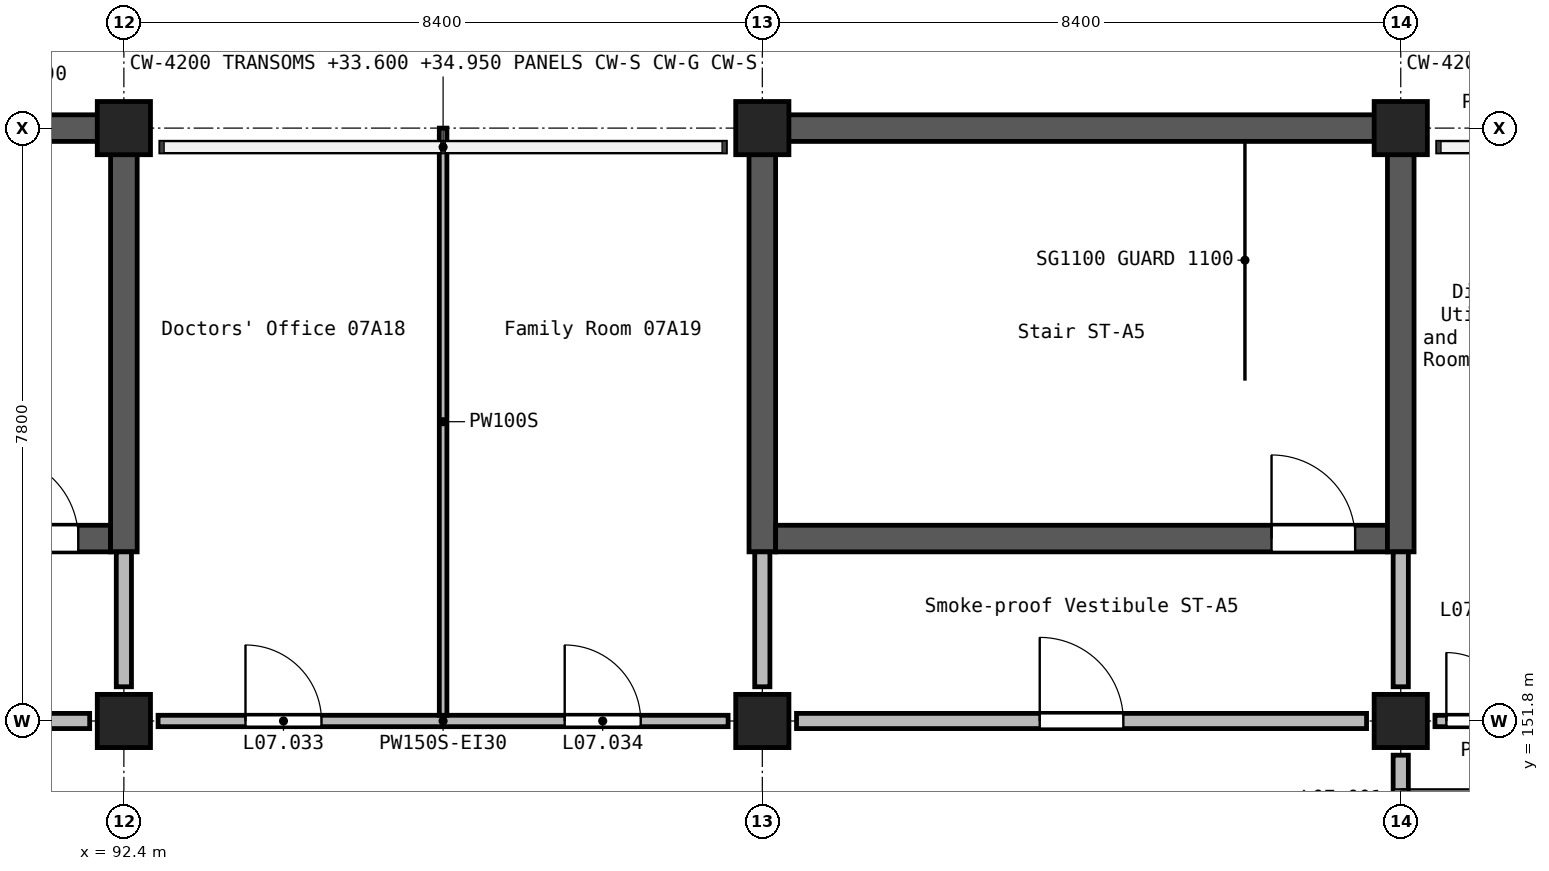
"""IFC4 building model, lengths in metres.
Left out: names, types, materials, properties, quantities, classifications, styles, units other than length and angle.
Written with IfcOpenShell. Run it as: python <this file> out.ifc"""

import sys

from ifc_helpers import new_model, si_unit, direction, frame, frame_2d, origin, origin_2d, place, context, subcontext, project, spatial, rectangle, extrude, element, fill, save


model = new_model("IFC4")
c1 = context("Model", 3, precision=1e-05, world=origin(), true_north=direction((0.0, 1.0)))
c2 = subcontext(c1, "Body", "Model", "MODEL_VIEW")
j1 = project(units=[si_unit("LENGTHUNIT", "METRE"), si_unit("PLANEANGLEUNIT", "RADIAN")], contexts=[c1])
p1 = place(None, origin())
s1 = spatial("IfcSite", under=j1, at=p1, CompositionType="ELEMENT")
p2 = place(p1, origin())
s2 = spatial("IfcBuilding", under=s1, at=p2, CompositionType="ELEMENT")
p3 = place(p2, frame((0.0, 0.0, 32.7)))
s3 = spatial("IfcBuildingStorey", under=s2, at=p3, CompositionType="ELEMENT", Elevation=32.7)
for number, where, z_axis, x_axis in (
    (1, (92.4, 151.8, 0.0), (0.0, 0.0, 1.0), (1.0, 0.0, 0.0)),
    (2, (92.4, 159.6, 0.0), (0.0, 0.0, 1.0), (1.0, 0.0, 0.0)),
    (3, (100.8, 151.8, 0.0), (0.0, 0.0, 1.0), (1.0, 0.0, 0.0)),
    (4, (100.8, 159.6, 0.0), (0.0, 0.0, 1.0), (1.0, 0.0, 0.0)),
    (5, (109.2, 151.8, 0.0), (0.0, 0.0, 1.0), (1.0, 0.0, 0.0)),
    (6, (109.2, 159.6, 0.0), (0.0, 0.0, 1.0), (1.0, 0.0, 0.0)),
):
    element("IfcColumn", number, at=place(p3, frame(where, z_axis=z_axis, x_axis=x_axis)), inside=s3, PredefinedType="COLUMN", context=c2, shape_type="SweptSolid", body=[
        extrude(rectangle(XDim=0.7, YDim=0.7, at=origin_2d()), origin(), (0.0, 0.0, 1.0), 3.9),
    ])
p4 = place(p3, frame((83.825, 159.6, 0.0), z_axis=(0.0, 0.0, 1.0), x_axis=(1.0, 0.0, 0.0)))
e7 = element("IfcWall", 7, at=p4, inside=s3, PredefinedType="SHEAR", context=c2, shape_type="SweptSolid", body=[
    extrude(rectangle(XDim=8.4, YDim=0.35, at=frame_2d((4.2, 0.0))), origin(), (0.0, 0.0, 1.0), 3.9),
])
p5 = place(p3, frame((84.175, 154.2, 0.0), z_axis=(0.0, 0.0, 1.0), x_axis=(1.0, 0.0, 0.0)))
e8 = element("IfcWall", 8, at=p5, inside=s3, PredefinedType="SHEAR", context=c2, shape_type="SweptSolid", body=[
    extrude(rectangle(XDim=8.05, YDim=0.35, at=frame_2d((4.025, 0.0))), origin(), (0.0, 0.0, 1.0), 3.9),
])
p6 = place(p5, frame((6.525, 0.0, 0.0)))
e9 = element("IfcOpeningElement", 9, at=p6, cuts=e8, PredefinedType="OPENING", context=c2, shape_type="SweptSolid", body=[
    extrude(rectangle(XDim=1.1, YDim=2.1, at=frame_2d((0.55, 1.05))), frame((0.0, 0.185, 0.0), z_axis=(0.0, -1.0, 0.0), x_axis=(1.0, 0.0, 0.0)), (0.0, 0.0, 1.0), 0.37),
])
p7 = place(p3, frame((92.4, 154.025, 0.0), z_axis=(0.0, 0.0, 1.0), x_axis=(0.0, 1.0, 0.0)))
e10 = element("IfcWall", 10, at=p7, inside=s3, PredefinedType="SHEAR", context=c2, shape_type="SweptSolid", body=[
    extrude(rectangle(XDim=5.75, YDim=0.35, at=frame_2d((2.875, 0.0))), origin(), (0.0, 0.0, 1.0), 3.9),
])
p8 = place(p3, frame((100.625, 159.6, 0.0), z_axis=(0.0, 0.0, 1.0), x_axis=(1.0, 0.0, 0.0)))
e11 = element("IfcWall", 11, at=p8, inside=s3, PredefinedType="SHEAR", context=c2, shape_type="SweptSolid", body=[
    extrude(rectangle(XDim=8.4, YDim=0.35, at=frame_2d((4.2, 0.0))), origin(), (0.0, 0.0, 1.0), 3.9),
])
p9 = place(p3, frame((100.8, 154.025, 0.0), z_axis=(0.0, 0.0, 1.0), x_axis=(0.0, 1.0, 0.0)))
e12 = element("IfcWall", 12, at=p9, inside=s3, PredefinedType="SHEAR", context=c2, shape_type="SweptSolid", body=[
    extrude(rectangle(XDim=5.4, YDim=0.35, at=frame_2d((2.7, 0.0))), origin(), (0.0, 0.0, 1.0), 3.9),
])
p10 = place(p3, frame((100.975, 154.2, 0.0), z_axis=(0.0, 0.0, 1.0), x_axis=(1.0, 0.0, 0.0)))
e13 = element("IfcWall", 13, at=p10, inside=s3, PredefinedType="SHEAR", context=c2, shape_type="SweptSolid", body=[
    extrude(rectangle(XDim=8.05, YDim=0.35, at=frame_2d((4.025, 0.0))), origin(), (0.0, 0.0, 1.0), 3.9),
])
p11 = place(p10, frame((6.525, 0.0, 0.0)))
e14 = element("IfcOpeningElement", 14, at=p11, cuts=e13, PredefinedType="OPENING", context=c2, shape_type="SweptSolid", body=[
    extrude(rectangle(XDim=1.1, YDim=2.1, at=frame_2d((0.55, 1.05))), frame((0.0, 0.185, 0.0), z_axis=(0.0, -1.0, 0.0), x_axis=(1.0, 0.0, 0.0)), (0.0, 0.0, 1.0), 0.37),
])
p12 = place(p3, frame((109.2, 154.025, 0.0), z_axis=(0.0, 0.0, 1.0), x_axis=(0.0, 1.0, 0.0)))
e15 = element("IfcWall", 15, at=p12, inside=s3, PredefinedType="SHEAR", context=c2, shape_type="SweptSolid", body=[
    extrude(rectangle(XDim=5.75, YDim=0.35, at=frame_2d((2.875, 0.0))), origin(), (0.0, 0.0, 1.0), 3.9),
])
p13 = place(p3, frame((109.2, 154.025, 0.0), z_axis=(0.0, 0.0, 1.0), x_axis=(0.0, -1.0, 0.0)))
e16 = element("IfcWall", 16, at=p13, inside=s3, PredefinedType="SOLIDWALL", context=c2, shape_type="SweptSolid", body=[
    extrude(rectangle(XDim=1.775, YDim=0.2, at=frame_2d((0.887, 0.0))), origin(), (0.0, 0.0, 1.0), 3.6),
])
p14 = place(p3, frame((109.2, 151.35, 0.0), z_axis=(0.0, 0.0, 1.0), x_axis=(0.0, -1.0, 0.0)))
e17 = element("IfcWall", 17, at=p14, inside=s3, PredefinedType="SOLIDWALL", context=c2, shape_type="SweptSolid", body=[
    extrude(rectangle(XDim=2.7, YDim=0.2, at=frame_2d((1.35, 0.0))), origin(), (0.0, 0.0, 1.0), 3.6),
])
p15 = place(p14, frame((0.45, 0.0, 0.0)))
e18 = element("IfcOpeningElement", 18, at=p15, cuts=e17, PredefinedType="OPENING", context=c2, shape_type="SweptSolid", body=[
    extrude(rectangle(XDim=1.8, YDim=2.1, at=frame_2d((0.9, 1.05))), frame((0.0, 0.11, 0.0), z_axis=(0.0, -1.0, 0.0), x_axis=(1.0, 0.0, 0.0)), (0.0, 0.0, 1.0), 0.22),
])
p16 = place(p3, frame((84.45, 151.8, 0.0), z_axis=(0.0, 0.0, 1.0), x_axis=(1.0, 0.0, 0.0)))
e19 = element("IfcWall", 19, at=p16, inside=s3, PredefinedType="SOLIDWALL", context=c2, shape_type="SweptSolid", body=[
    extrude(rectangle(XDim=7.5, YDim=0.2, at=frame_2d((3.75, 0.0))), origin(), (0.0, 0.0, 1.0), 3.6),
])
p17 = place(p16, frame((3.2, 0.0, 0.0)))
e20 = element("IfcOpeningElement", 20, at=p17, cuts=e19, PredefinedType="OPENING", context=c2, shape_type="SweptSolid", body=[
    extrude(rectangle(XDim=1.1, YDim=2.1, at=frame_2d((0.55, 1.05))), frame((0.0, 0.11, 0.0), z_axis=(0.0, -1.0, 0.0), x_axis=(1.0, 0.0, 0.0)), (0.0, 0.0, 1.0), 0.22),
])
p18 = place(p3, frame((101.25, 151.8, 0.0), z_axis=(0.0, 0.0, 1.0), x_axis=(1.0, 0.0, 0.0)))
e21 = element("IfcWall", 21, at=p18, inside=s3, PredefinedType="SOLIDWALL", context=c2, shape_type="SweptSolid", body=[
    extrude(rectangle(XDim=7.5, YDim=0.2, at=frame_2d((3.75, 0.0))), origin(), (0.0, 0.0, 1.0), 3.6),
])
p19 = place(p18, frame((3.2, 0.0, 0.0)))
e22 = element("IfcOpeningElement", 22, at=p19, cuts=e21, PredefinedType="OPENING", context=c2, shape_type="SweptSolid", body=[
    extrude(rectangle(XDim=1.1, YDim=2.1, at=frame_2d((0.55, 1.05))), frame((0.0, 0.11, 0.0), z_axis=(0.0, -1.0, 0.0), x_axis=(1.0, 0.0, 0.0)), (0.0, 0.0, 1.0), 0.22),
])
for number, where, z_axis, x_axis in (
    (23, (92.4, 152.25, 0.0), (0.0, 0.0, 1.0), (0.0, 1.0, 0.0)),
    (24, (100.8, 152.25, 0.0), (0.0, 0.0, 1.0), (0.0, 1.0, 0.0)),
):
    element("IfcWall", number, at=place(p3, frame(where, z_axis=z_axis, x_axis=x_axis)), inside=s3, PredefinedType="SOLIDWALL", context=c2, shape_type="SweptSolid", body=[
        extrude(rectangle(XDim=1.775, YDim=0.2, at=frame_2d((0.887, 0.0))), origin(), (0.0, 0.0, 1.0), 3.6),
    ])
p20 = place(p3, frame((92.85, 151.8, 0.0), z_axis=(0.0, 0.0, 1.0), x_axis=(1.0, 0.0, 0.0)))
e25 = element("IfcWall", 25, at=p20, inside=s3, PredefinedType="PARTITIONING", context=c2, shape_type="SweptSolid", body=[
    extrude(rectangle(XDim=7.5, YDim=0.15, at=frame_2d((3.75, 0.0))), origin(), (0.0, 0.0, 1.0), 3.6),
])
p21 = place(p20, frame((1.15, 0.0, 0.0)))
e26 = element("IfcOpeningElement", 26, at=p21, cuts=e25, PredefinedType="OPENING", context=c2, shape_type="SweptSolid", body=[
    extrude(rectangle(XDim=1.0, YDim=2.1, at=frame_2d((0.5, 1.05))), frame((0.0, 0.085, 0.0), z_axis=(0.0, -1.0, 0.0), x_axis=(1.0, 0.0, 0.0)), (0.0, 0.0, 1.0), 0.17),
])
p22 = place(p20, frame((5.35, 0.0, 0.0)))
e27 = element("IfcOpeningElement", 27, at=p22, cuts=e25, PredefinedType="OPENING", context=c2, shape_type="SweptSolid", body=[
    extrude(rectangle(XDim=1.0, YDim=2.1, at=frame_2d((0.5, 1.05))), frame((0.0, 0.085, 0.0), z_axis=(0.0, -1.0, 0.0), x_axis=(1.0, 0.0, 0.0)), (0.0, 0.0, 1.0), 0.17),
])
p23 = place(p3, frame((109.65, 151.8, 0.0), z_axis=(0.0, 0.0, 1.0), x_axis=(1.0, 0.0, 0.0)))
e28 = element("IfcWall", 28, at=p23, inside=s3, PredefinedType="PARTITIONING", context=c2, shape_type="SweptSolid", body=[
    extrude(rectangle(XDim=1.575, YDim=0.15, at=frame_2d((0.788, 0.0))), origin(), (0.0, 0.0, 1.0), 3.6),
])
p24 = place(p23, frame((0.15, 0.0, 0.0)))
e29 = element("IfcOpeningElement", 29, at=p24, cuts=e28, PredefinedType="OPENING", context=c2, shape_type="SweptSolid", body=[
    extrude(rectangle(XDim=0.9, YDim=2.1, at=frame_2d((0.45, 1.05))), frame((0.0, 0.085, 0.0), z_axis=(0.0, -1.0, 0.0), x_axis=(1.0, 0.0, 0.0)), (0.0, 0.0, 1.0), 0.17),
])
p25 = place(p3, frame((96.6, 151.875, 0.0), z_axis=(0.0, 0.0, 1.0), x_axis=(0.0, 1.0, 0.0)))
e30 = element("IfcWall", 30, at=p25, inside=s3, PredefinedType="PARTITIONING", context=c2, shape_type="SweptSolid", body=[
    extrude(rectangle(XDim=7.725, YDim=0.1, at=frame_2d((3.863, 0.0))), origin(), (0.0, 0.0, 1.0), 3.6),
])
p26 = place(p15, origin())
e31 = element("IfcDoor", 31, at=p26, inside=s3, OperationType="DOUBLE_DOOR_SINGLE_SWING", PredefinedType="DOOR", context=c2, shape_type="SweptSolid", body=[
    extrude(rectangle(XDim=1.8, YDim=2.1, at=frame_2d((0.9, 1.05))), frame((0.0, 0.025, 0.0), z_axis=(0.0, -1.0, 0.0), x_axis=(1.0, 0.0, 0.0)), (0.0, 0.0, 1.0), 0.05),
])
fill(e18, e31)
p27 = place(p21, origin())
e32 = element("IfcDoor", 32, at=p27, inside=s3, OperationType="SINGLE_SWING_LEFT", PredefinedType="DOOR", context=c2, shape_type="SweptSolid", body=[
    extrude(rectangle(XDim=1.0, YDim=2.1, at=frame_2d((0.5, 1.05))), frame((0.0, 0.025, 0.0), z_axis=(0.0, -1.0, 0.0), x_axis=(1.0, 0.0, 0.0)), (0.0, 0.0, 1.0), 0.05),
])
fill(e26, e32)
p28 = place(p22, origin())
e33 = element("IfcDoor", 33, at=p28, inside=s3, OperationType="SINGLE_SWING_RIGHT", PredefinedType="DOOR", context=c2, shape_type="SweptSolid", body=[
    extrude(rectangle(XDim=1.0, YDim=2.1, at=frame_2d((0.5, 1.05))), frame((0.0, 0.025, 0.0), z_axis=(0.0, -1.0, 0.0), x_axis=(1.0, 0.0, 0.0)), (0.0, 0.0, 1.0), 0.05),
])
fill(e27, e33)
p29 = place(p24, origin())
e34 = element("IfcDoor", 34, at=p29, inside=s3, OperationType="SINGLE_SWING_LEFT", PredefinedType="DOOR", context=c2, shape_type="SweptSolid", body=[
    extrude(rectangle(XDim=0.9, YDim=2.1, at=frame_2d((0.45, 1.05))), frame((0.0, 0.025, 0.0), z_axis=(0.0, -1.0, 0.0), x_axis=(1.0, 0.0, 0.0)), (0.0, 0.0, 1.0), 0.05),
])
fill(e29, e34)
p30 = place(p6, origin())
e35 = element("IfcDoor", 35, at=p30, inside=s3, OperationType="SINGLE_SWING_RIGHT", PredefinedType="DOOR", context=c2, shape_type="SweptSolid", body=[
    extrude(rectangle(XDim=1.1, YDim=2.1, at=frame_2d((0.55, 1.05))), frame((0.0, 0.025, 0.0), z_axis=(0.0, -1.0, 0.0), x_axis=(1.0, 0.0, 0.0)), (0.0, 0.0, 1.0), 0.05),
])
fill(e9, e35)
p31 = place(p11, origin())
e36 = element("IfcDoor", 36, at=p31, inside=s3, OperationType="SINGLE_SWING_RIGHT", PredefinedType="DOOR", context=c2, shape_type="SweptSolid", body=[
    extrude(rectangle(XDim=1.1, YDim=2.1, at=frame_2d((0.55, 1.05))), frame((0.0, 0.025, 0.0), z_axis=(0.0, -1.0, 0.0), x_axis=(1.0, 0.0, 0.0)), (0.0, 0.0, 1.0), 0.05),
])
fill(e14, e36)
p32 = place(p19, origin())
e37 = element("IfcDoor", 37, at=p32, inside=s3, OperationType="SINGLE_SWING_RIGHT", PredefinedType="DOOR", context=c2, shape_type="SweptSolid", body=[
    extrude(rectangle(XDim=1.1, YDim=2.1, at=frame_2d((0.55, 1.05))), frame((0.0, 0.025, 0.0), z_axis=(0.0, -1.0, 0.0), x_axis=(1.0, 0.0, 0.0)), (0.0, 0.0, 1.0), 0.05),
])
fill(e22, e37)
save(model, sys.argv[1])
